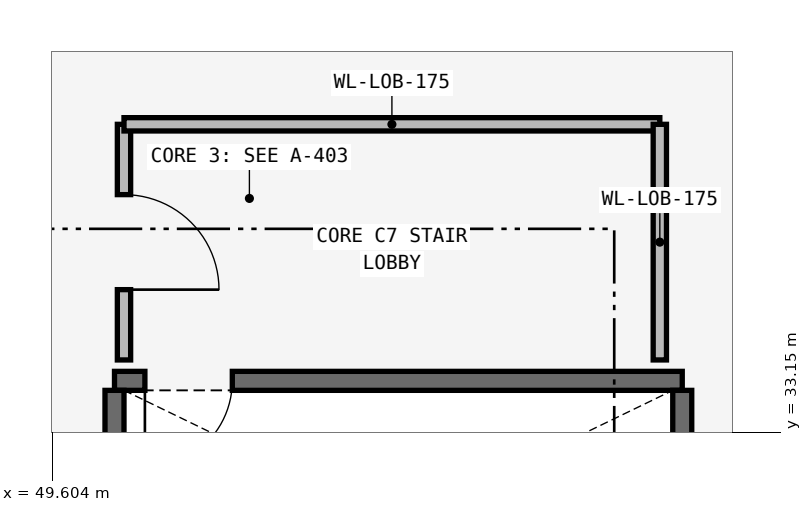
"""IFC4 building model, lengths in metres.
Left out: names, types, materials, properties, quantities, classifications, styles, units other than length and angle.
Written with IfcOpenShell. Run it as: python <this file> out.ifc"""

import sys

from ifc_helpers import new_model, si_unit, direction, frame, frame_2d, origin, place, context, subcontext, project, spatial, rectangle, extrude, element, fill, save


model = new_model("IFC4")
c1 = context("Model", 3, precision=1e-05, world=origin(), true_north=direction((0.0, 1.0)))
c2 = subcontext(c1, "Body", "Model", "MODEL_VIEW")
j1 = project(units=[si_unit("LENGTHUNIT", "METRE"), si_unit("PLANEANGLEUNIT", "RADIAN")], contexts=[c1])
p1 = place(None, origin())
s1 = spatial("IfcSite", under=j1, at=p1, CompositionType="ELEMENT")
p2 = place(p1, origin())
s2 = spatial("IfcBuilding", under=s1, at=p2, CompositionType="ELEMENT")
p3 = place(p2, frame((0.0, 0.0, 5.4)))
s3 = spatial("IfcBuildingStorey", under=s2, at=p3, CompositionType="ELEMENT", Elevation=5.4)
p4 = place(p3, frame((50.425, 33.825, 0.0), z_axis=(0.0, 0.0, 1.0), x_axis=(1.0, 0.0, 0.0)))
e1 = element("IfcWall", 1, at=p4, inside=s3, PredefinedType="SHEAR", context=c2, shape_type="SweptSolid", body=[
    extrude(rectangle(XDim=7.47, YDim=0.25, at=frame_2d((3.735, 0.0))), origin(), (0.0, 0.0, 1.0), 4.52),
])
p5 = place(p4, frame((0.4, 0.0, 0.0)))
e2 = element("IfcOpeningElement", 2, at=p5, cuts=e1, PredefinedType="OPENING", context=c2, shape_type="SweptSolid", body=[
    extrude(rectangle(XDim=1.15, YDim=2.15, at=frame_2d((0.575, 1.075))), frame((0.0, 0.14, 0.0), z_axis=(0.0, -1.0, 0.0), x_axis=(1.0, 0.0, 0.0)), (0.0, 0.0, 1.0), 0.28),
])
for number, where, z_axis, x_axis in (
    (3, (50.425, 30.2, 0.0), (0.0, 0.0, 1.0), (0.0, 1.0, 0.0)),
    (4, (57.895, 30.2, 0.0), (0.0, 0.0, 1.0), (0.0, 1.0, 0.0)),
):
    element("IfcWall", number, at=place(p3, frame(where, z_axis=z_axis, x_axis=x_axis)), inside=s3, PredefinedType="SHEAR", context=c2, shape_type="SweptSolid", body=[
        extrude(rectangle(XDim=3.5, YDim=0.25, at=frame_2d((1.75, 0.0))), origin(), (0.0, 0.0, 1.0), 4.52),
    ])
p6 = place(p3, frame((50.55, 34.1, 0.0), z_axis=(0.0, 0.0, 1.0), x_axis=(0.0, 1.0, 0.0)))
e5 = element("IfcWall", 5, at=p6, inside=s3, PredefinedType="PARTITIONING", context=c2, shape_type="SweptSolid", body=[
    extrude(rectangle(XDim=3.1, YDim=0.175, at=frame_2d((1.55, 0.0))), origin(), (0.0, 0.0, 1.0), 4.52),
])
p7 = place(p6, frame((0.925, 0.0, 0.0)))
e6 = element("IfcOpeningElement", 6, at=p7, cuts=e5, PredefinedType="OPENING", context=c2, shape_type="SweptSolid", body=[
    extrude(rectangle(XDim=1.25, YDim=2.2, at=frame_2d((0.625, 1.1))), frame((0.0, 0.103, 0.0), z_axis=(0.0, -1.0, 0.0), x_axis=(1.0, 0.0, 0.0)), (0.0, 0.0, 1.0), 0.205),
])
p8 = place(p3, frame((50.55, 37.2, 0.0), z_axis=(0.0, 0.0, 1.0), x_axis=(1.0, 0.0, 0.0)))
e7 = element("IfcWall", 7, at=p8, inside=s3, PredefinedType="PARTITIONING", context=c2, shape_type="SweptSolid", body=[
    extrude(rectangle(XDim=7.05, YDim=0.175, at=frame_2d((3.525, 0.0))), origin(), (0.0, 0.0, 1.0), 4.52),
])
p9 = place(p3, frame((57.6, 34.1, 0.0), z_axis=(0.0, 0.0, 1.0), x_axis=(0.0, 1.0, 0.0)))
e8 = element("IfcWall", 8, at=p9, inside=s3, PredefinedType="PARTITIONING", context=c2, shape_type="SweptSolid", body=[
    extrude(rectangle(XDim=3.1, YDim=0.175, at=frame_2d((1.55, 0.0))), origin(), (0.0, 0.0, 1.0), 4.52),
])
p10 = place(p5, frame((1.15, 0.0, 0.0), z_axis=(0.0, 0.0, 1.0), x_axis=(-1.0, 0.0, 0.0)))
e9 = element("IfcDoor", 9, at=p10, inside=s3, OperationType="SINGLE_SWING_LEFT", PredefinedType="DOOR", context=c2, shape_type="SweptSolid", body=[
    extrude(rectangle(XDim=1.15, YDim=2.15, at=frame_2d((0.575, 1.075))), frame((0.0, 0.025, 0.0), z_axis=(0.0, -1.0, 0.0), x_axis=(1.0, 0.0, 0.0)), (0.0, 0.0, 1.0), 0.05),
])
fill(e2, e9)
p11 = place(p7, frame((1.25, 0.0, 0.0), z_axis=(0.0, 0.0, 1.0), x_axis=(-1.0, 0.0, 0.0)))
e10 = element("IfcDoor", 10, at=p11, inside=s3, OperationType="SINGLE_SWING_LEFT", PredefinedType="DOOR", context=c2, shape_type="SweptSolid", body=[
    extrude(rectangle(XDim=1.25, YDim=2.2, at=frame_2d((0.625, 1.1))), frame((0.0, 0.025, 0.0), z_axis=(0.0, -1.0, 0.0), x_axis=(1.0, 0.0, 0.0)), (0.0, 0.0, 1.0), 0.05),
])
fill(e6, e10)
save(model, sys.argv[1])
